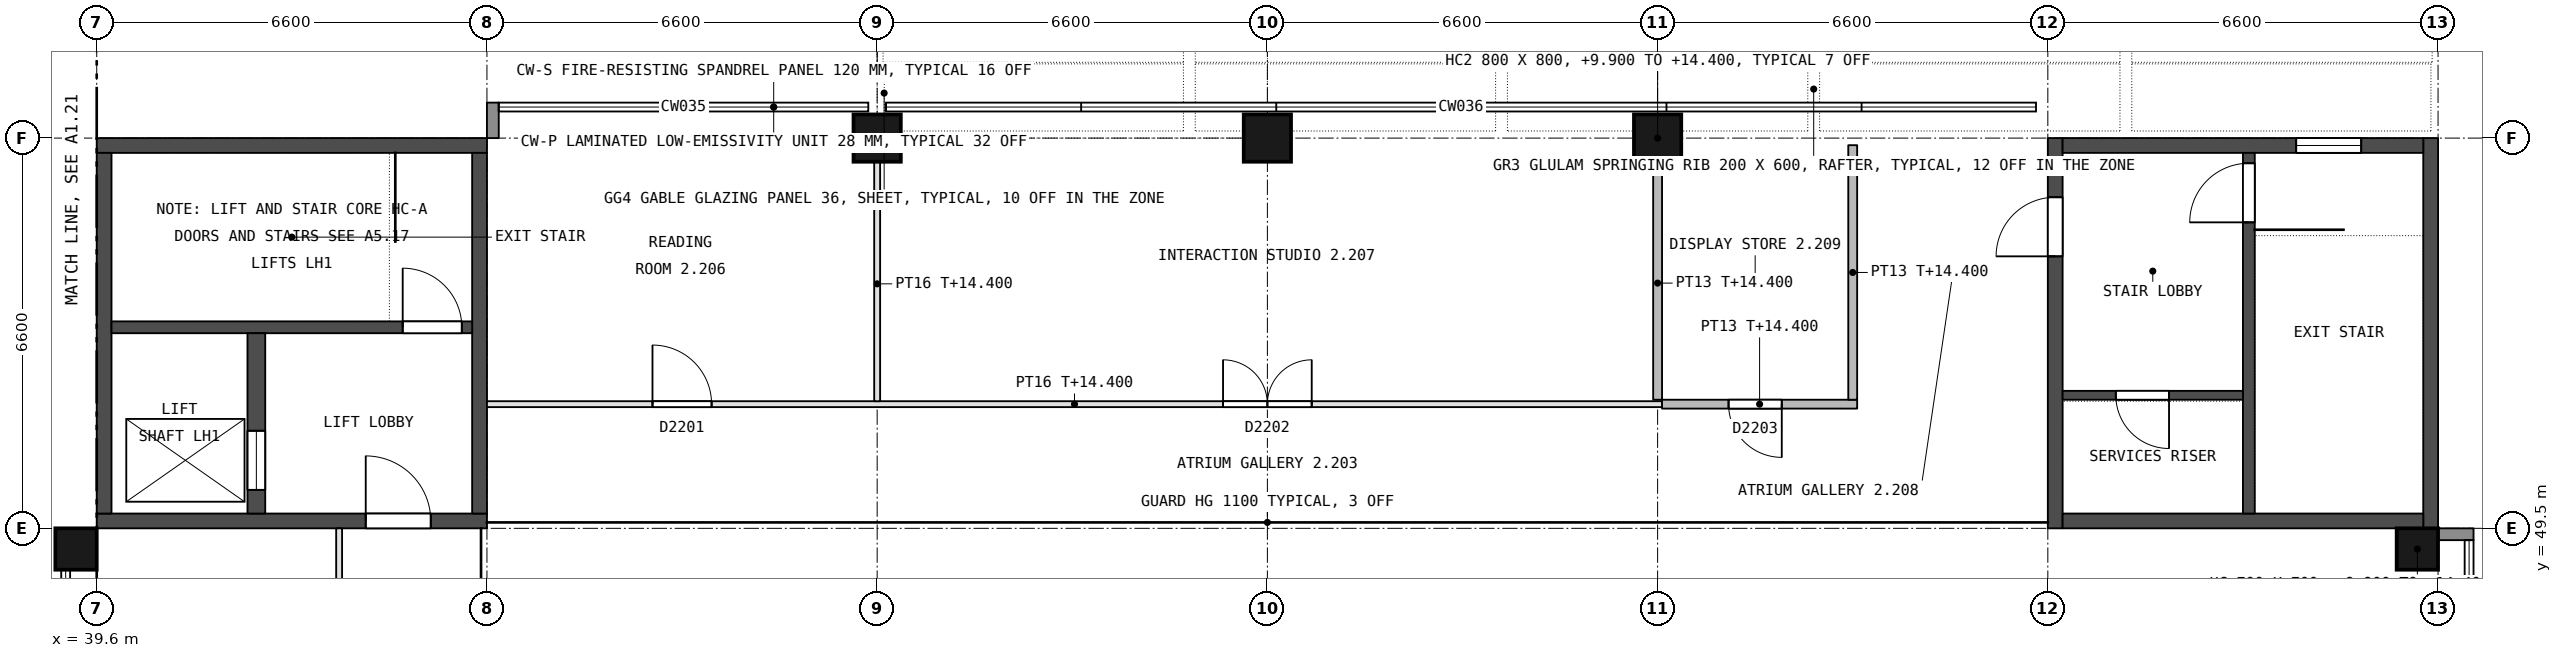
"""IFC4 building model, lengths in metres.
Left out: names, types, materials, properties, quantities, classifications, styles, units other than length and angle.
Written with IfcOpenShell. Run it as: python <this file> out.ifc"""

import sys

from ifc_helpers import new_model, si_unit, direction, frame, frame_2d, origin, origin_2d, place, context, subcontext, project, spatial, rectangle, extrude, element, fill, save


model = new_model("IFC4")
c1 = context("Model", 3, precision=1e-05, world=origin(), true_north=direction((0.0, 1.0)))
c2 = subcontext(c1, "Body", "Model", "MODEL_VIEW")
j1 = project(units=[si_unit("LENGTHUNIT", "METRE"), si_unit("PLANEANGLEUNIT", "RADIAN")], contexts=[c1])
p1 = place(None, origin())
s1 = spatial("IfcSite", under=j1, at=p1, CompositionType="ELEMENT")
p2 = place(p1, origin())
s2 = spatial("IfcBuilding", under=s1, at=p2, CompositionType="ELEMENT")
p3 = place(p2, frame((0.0, 0.0, 9.9)))
s3 = spatial("IfcBuildingStorey", under=s2, at=p3, CompositionType="ELEMENT", Elevation=9.9)
for number, where, z_axis, x_axis in (
    (1, (52.8, 56.1, 0.0), (0.0, 0.0, 1.0), (1.0, 0.0, 0.0)),
    (2, (59.4, 56.1, 0.0), (0.0, 0.0, 1.0), (1.0, 0.0, 0.0)),
    (3, (66.0, 56.1, 0.0), (0.0, 0.0, 1.0), (1.0, 0.0, 0.0)),
):
    element("IfcColumn", number, at=place(p3, frame(where, z_axis=z_axis, x_axis=x_axis)), inside=s3, PredefinedType="COLUMN", context=c2, shape_type="SweptSolid", body=[
        extrude(rectangle(XDim=0.8, YDim=0.8, at=origin_2d()), origin(), (0.0, 0.0, 1.0), 4.5),
    ])
for number, where, z_axis, x_axis in (
    (4, (39.25, 49.15, 0.0), (0.0, 0.0, 1.0), (1.0, 0.0, 0.0)),
    (5, (78.85, 49.15, 0.0), (0.0, 0.0, 1.0), (1.0, 0.0, 0.0)),
):
    element("IfcColumn", number, at=place(p3, frame(where, z_axis=z_axis, x_axis=x_axis)), inside=s3, PredefinedType="COLUMN", context=c2, shape_type="SweptSolid", body=[
        extrude(rectangle(XDim=0.7, YDim=0.7, at=origin_2d()), origin(), (0.0, 0.0, 1.0), 4.5),
    ])
p4 = place(p3, frame((39.6, 49.625, 0.0), z_axis=(0.0, 0.0, 1.0), x_axis=(1.0, 0.0, 0.0)))
e6 = element("IfcWall", 6, at=p4, inside=s3, PredefinedType="SHEAR", context=c2, shape_type="SweptSolid", body=[
    extrude(rectangle(XDim=6.6, YDim=0.25, at=frame_2d((3.3, 0.0))), origin(), (0.0, 0.0, 1.0), 4.25),
])
p5 = place(p4, frame((4.55, 0.0, 0.0)))
e7 = element("IfcOpeningElement", 7, at=p5, cuts=e6, PredefinedType="OPENING", context=c2, shape_type="SweptSolid", body=[
    extrude(rectangle(XDim=1.1, YDim=2.1, at=frame_2d((0.55, 1.05))), frame((0.0, 0.135, 0.0), z_axis=(0.0, -1.0, 0.0), x_axis=(1.0, 0.0, 0.0)), (0.0, 0.0, 1.0), 0.27),
])
p6 = place(p3, frame((39.6, 55.975, 0.0), z_axis=(0.0, 0.0, 1.0), x_axis=(1.0, 0.0, 0.0)))
e8 = element("IfcWall", 8, at=p6, inside=s3, PredefinedType="SHEAR", context=c2, shape_type="SweptSolid", body=[
    extrude(rectangle(XDim=6.6, YDim=0.25, at=frame_2d((3.3, 0.0))), origin(), (0.0, 0.0, 1.0), 4.25),
])
for number, where, z_axis, x_axis in (
    (9, (46.075, 49.75, 0.0), (0.0, 0.0, 1.0), (0.0, 1.0, 0.0)),
    (10, (39.725, 49.75, 0.0), (0.0, 0.0, 1.0), (0.0, 1.0, 0.0)),
):
    element("IfcWall", number, at=place(p3, frame(where, z_axis=z_axis, x_axis=x_axis)), inside=s3, PredefinedType="SHEAR", context=c2, shape_type="SweptSolid", body=[
        extrude(rectangle(XDim=6.1, YDim=0.25, at=frame_2d((3.05, 0.0))), origin(), (0.0, 0.0, 1.0), 4.25),
    ])
p7 = place(p3, frame((39.85, 52.9, 0.0), z_axis=(0.0, 0.0, 1.0), x_axis=(1.0, 0.0, 0.0)))
e11 = element("IfcWall", 11, at=p7, inside=s3, PredefinedType="SHEAR", context=c2, shape_type="SweptSolid", body=[
    extrude(rectangle(XDim=6.1, YDim=0.2, at=frame_2d((3.05, 0.0))), origin(), (0.0, 0.0, 1.0), 4.25),
])
p8 = place(p7, frame((4.925, 0.0, 0.0)))
e12 = element("IfcOpeningElement", 12, at=p8, cuts=e11, PredefinedType="OPENING", context=c2, shape_type="SweptSolid", body=[
    extrude(rectangle(XDim=1.0, YDim=2.1, at=frame_2d((0.5, 1.05))), frame((0.0, 0.11, 0.0), z_axis=(0.0, -1.0, 0.0), x_axis=(1.0, 0.0, 0.0)), (0.0, 0.0, 1.0), 0.22),
])
p9 = place(p3, frame((42.3, 49.75, 0.0), z_axis=(0.0, 0.0, 1.0), x_axis=(0.0, 1.0, 0.0)))
e13 = element("IfcWall", 13, at=p9, inside=s3, PredefinedType="SHEAR", context=c2, shape_type="SweptSolid", body=[
    extrude(rectangle(XDim=3.05, YDim=0.3, at=frame_2d((1.525, 0.0))), origin(), (0.0, 0.0, 1.0), 4.25),
])
p10 = place(p9, frame((0.4, 0.0, 0.0)))
e14 = element("IfcOpeningElement", 14, at=p10, cuts=e13, PredefinedType="OPENING", context=c2, shape_type="SweptSolid", body=[
    extrude(rectangle(XDim=1.0, YDim=2.1, at=frame_2d((0.5, 1.05))), frame((0.0, 0.16, 0.0), z_axis=(0.0, -1.0, 0.0), x_axis=(1.0, 0.0, 0.0)), (0.0, 0.0, 1.0), 0.32),
])
p11 = place(p3, frame((72.725, 56.1, 0.0), z_axis=(0.0, 0.0, 1.0), x_axis=(0.0, -1.0, 0.0)))
e15 = element("IfcWall", 15, at=p11, inside=s3, PredefinedType="SHEAR", context=c2, shape_type="SweptSolid", body=[
    extrude(rectangle(XDim=6.6, YDim=0.25, at=frame_2d((3.3, 0.0))), origin(), (0.0, 0.0, 1.0), 4.25),
])
p12 = place(p11, frame((1.0, 0.0, 0.0)))
e16 = element("IfcOpeningElement", 16, at=p12, cuts=e15, PredefinedType="OPENING", context=c2, shape_type="SweptSolid", body=[
    extrude(rectangle(XDim=1.0, YDim=2.1, at=frame_2d((0.5, 1.05))), frame((0.0, 0.135, 0.0), z_axis=(0.0, -1.0, 0.0), x_axis=(1.0, 0.0, 0.0)), (0.0, 0.0, 1.0), 0.27),
])
p13 = place(p3, frame((79.075, 56.1, 0.0), z_axis=(0.0, 0.0, 1.0), x_axis=(0.0, -1.0, 0.0)))
e17 = element("IfcWall", 17, at=p13, inside=s3, PredefinedType="SHEAR", context=c2, shape_type="SweptSolid", body=[
    extrude(rectangle(XDim=6.6, YDim=0.25, at=frame_2d((3.3, 0.0))), origin(), (0.0, 0.0, 1.0), 4.25),
])
p14 = place(p3, frame((72.85, 55.975, 0.0), z_axis=(0.0, 0.0, 1.0), x_axis=(1.0, 0.0, 0.0)))
e18 = element("IfcWall", 18, at=p14, inside=s3, PredefinedType="SHEAR", context=c2, shape_type="SweptSolid", body=[
    extrude(rectangle(XDim=6.1, YDim=0.25, at=frame_2d((3.05, 0.0))), origin(), (0.0, 0.0, 1.0), 4.25),
])
p15 = place(p14, frame((3.95, 0.0, 0.7)))
e19 = element("IfcOpeningElement", 19, at=p15, cuts=e18, PredefinedType="OPENING", context=c2, shape_type="SweptSolid", body=[
    extrude(rectangle(XDim=1.1, YDim=1.5, at=frame_2d((0.55, 0.75))), frame((0.0, 0.135, 0.0), z_axis=(0.0, -1.0, 0.0), x_axis=(1.0, 0.0, 0.0)), (0.0, 0.0, 1.0), 0.27),
])
p16 = place(p3, frame((72.85, 49.625, 0.0), z_axis=(0.0, 0.0, 1.0), x_axis=(1.0, 0.0, 0.0)))
e20 = element("IfcWall", 20, at=p16, inside=s3, PredefinedType="SHEAR", context=c2, shape_type="SweptSolid", body=[
    extrude(rectangle(XDim=6.1, YDim=0.25, at=frame_2d((3.05, 0.0))), origin(), (0.0, 0.0, 1.0), 4.25),
])
p17 = place(p3, frame((76.0, 55.85, 0.0), z_axis=(0.0, 0.0, 1.0), x_axis=(0.0, -1.0, 0.0)))
e21 = element("IfcWall", 21, at=p17, inside=s3, PredefinedType="SHEAR", context=c2, shape_type="SweptSolid", body=[
    extrude(rectangle(XDim=6.1, YDim=0.2, at=frame_2d((3.05, 0.0))), origin(), (0.0, 0.0, 1.0), 4.25),
])
p18 = place(p17, frame((0.175, 0.0, 0.0)))
e22 = element("IfcOpeningElement", 22, at=p18, cuts=e21, PredefinedType="OPENING", context=c2, shape_type="SweptSolid", body=[
    extrude(rectangle(XDim=1.0, YDim=2.1, at=frame_2d((0.5, 1.05))), frame((0.0, 0.11, 0.0), z_axis=(0.0, -1.0, 0.0), x_axis=(1.0, 0.0, 0.0)), (0.0, 0.0, 1.0), 0.22),
])
p19 = place(p3, frame((72.85, 51.75, 0.0), z_axis=(0.0, 0.0, 1.0), x_axis=(1.0, 0.0, 0.0)))
e23 = element("IfcWall", 23, at=p19, inside=s3, PredefinedType="SHEAR", context=c2, shape_type="SweptSolid", body=[
    extrude(rectangle(XDim=3.05, YDim=0.15, at=frame_2d((1.525, 0.0))), origin(), (0.0, 0.0, 1.0), 4.25),
])
p20 = place(p19, frame((0.9, 0.0, 0.0)))
e24 = element("IfcOpeningElement", 24, at=p20, cuts=e23, PredefinedType="OPENING", context=c2, shape_type="SweptSolid", body=[
    extrude(rectangle(XDim=0.9, YDim=2.1, at=frame_2d((0.45, 1.05))), frame((0.0, 0.085, 0.0), z_axis=(0.0, -1.0, 0.0), x_axis=(1.0, 0.0, 0.0)), (0.0, 0.0, 1.0), 0.17),
])
p21 = place(p3, frame((79.2, 49.4, 0.0), z_axis=(0.0, 0.0, 1.0), x_axis=(1.0, 0.0, 0.0)))
e25 = element("IfcWall", 25, at=p21, inside=s3, PredefinedType="STANDARD", context=c2, shape_type="SweptSolid", body=[
    extrude(rectangle(XDim=0.6, YDim=0.2, at=frame_2d((0.3, 0.0))), origin(), (0.0, 0.0, 1.0), 4.5),
])
p22 = place(p3, frame((46.3, 56.1, 0.0), z_axis=(0.0, 0.0, 1.0), x_axis=(0.0, 1.0, 0.0)))
e26 = element("IfcWall", 26, at=p22, inside=s3, PredefinedType="STANDARD", context=c2, shape_type="SweptSolid", body=[
    extrude(rectangle(XDim=0.6, YDim=0.2, at=frame_2d((0.3, 0.0))), origin(), (0.0, 0.0, 1.0), 4.5),
])
p23 = place(p3, frame((39.6, 49.4, 0.0), z_axis=(0.0, 0.0, 1.0), x_axis=(-1.0, 0.0, 0.0)))
e27 = element("IfcWall", 27, at=p23, inside=s3, PredefinedType="STANDARD", context=c2, shape_type="SweptSolid", body=[
    extrude(rectangle(XDim=0.6, YDim=0.2, at=frame_2d((0.3, 0.0))), origin(), (0.0, 0.0, 1.0), 4.5),
])
p24 = place(p3, frame((46.2, 51.6, 0.0), z_axis=(0.0, 0.0, 1.0), x_axis=(1.0, 0.0, 0.0)))
e28 = element("IfcWall", 28, at=p24, inside=s3, PredefinedType="PARTITIONING", context=c2, shape_type="SweptSolid", body=[
    extrude(rectangle(XDim=19.875, YDim=0.1, at=frame_2d((9.938, 0.0))), origin(), (0.0, 0.0, 1.0), 4.5),
])
p25 = place(p24, frame((2.8, 0.0, 0.0)))
e29 = element("IfcOpeningElement", 29, at=p25, cuts=e28, PredefinedType="OPENING", context=c2, shape_type="SweptSolid", body=[
    extrude(rectangle(XDim=1.0, YDim=2.1, at=frame_2d((0.5, 1.05))), frame((0.0, 0.06, 0.0), z_axis=(0.0, -1.0, 0.0), x_axis=(1.0, 0.0, 0.0)), (0.0, 0.0, 1.0), 0.12),
])
p26 = place(p24, frame((12.45, 0.0, 0.0)))
e30 = element("IfcOpeningElement", 30, at=p26, cuts=e28, PredefinedType="OPENING", context=c2, shape_type="SweptSolid", body=[
    extrude(rectangle(XDim=1.5, YDim=2.1, at=frame_2d((0.75, 1.05))), frame((0.0, 0.06, 0.0), z_axis=(0.0, -1.0, 0.0), x_axis=(1.0, 0.0, 0.0)), (0.0, 0.0, 1.0), 0.12),
])
p27 = place(p3, frame((66.075, 51.6, 0.0), z_axis=(0.0, 0.0, 1.0), x_axis=(1.0, 0.0, 0.0)))
e31 = element("IfcWall", 31, at=p27, inside=s3, PredefinedType="PARTITIONING", context=c2, shape_type="SweptSolid", body=[
    extrude(rectangle(XDim=3.3, YDim=0.15, at=frame_2d((1.65, 0.0))), origin(), (0.0, 0.0, 1.0), 4.5),
])
p28 = place(p27, frame((1.125, 0.0, 0.0)))
e32 = element("IfcOpeningElement", 32, at=p28, cuts=e31, PredefinedType="OPENING", context=c2, shape_type="SweptSolid", body=[
    extrude(rectangle(XDim=0.9, YDim=2.1, at=frame_2d((0.45, 1.05))), frame((0.0, 0.085, 0.0), z_axis=(0.0, -1.0, 0.0), x_axis=(1.0, 0.0, 0.0)), (0.0, 0.0, 1.0), 0.17),
])
p29 = place(p3, frame((43.7, 42.9, 0.0), z_axis=(0.0, 0.0, 1.0), x_axis=(0.0, 1.0, 0.0)))
e33 = element("IfcWall", 33, at=p29, inside=s3, PredefinedType="PARTITIONING", context=c2, shape_type="SweptSolid", body=[
    extrude(rectangle(XDim=6.6, YDim=0.1, at=frame_2d((3.3, 0.0))), origin(), (0.0, 0.0, 1.0), 4.5),
])
p30 = place(p29, frame((2.8, 0.0, 0.0)))
e34 = element("IfcOpeningElement", 34, at=p30, cuts=e33, PredefinedType="OPENING", context=c2, shape_type="SweptSolid", body=[
    extrude(rectangle(XDim=1.0, YDim=2.1, at=frame_2d((0.5, 1.05))), frame((0.0, 0.06, 0.0), z_axis=(0.0, -1.0, 0.0), x_axis=(1.0, 0.0, 0.0)), (0.0, 0.0, 1.0), 0.12),
])
p31 = place(p3, frame((52.8, 51.65, 0.0), z_axis=(0.0, 0.0, 1.0), x_axis=(0.0, 1.0, 0.0)))
e35 = element("IfcWall", 35, at=p31, inside=s3, PredefinedType="PARTITIONING", context=c2, shape_type="SweptSolid", body=[
    extrude(rectangle(XDim=4.05, YDim=0.1, at=frame_2d((2.025, 0.0))), origin(), (0.0, 0.0, 1.0), 4.5),
])
p32 = place(p3, frame((66.0, 51.675, 0.0), z_axis=(0.0, 0.0, 1.0), x_axis=(0.0, 1.0, 0.0)))
e36 = element("IfcWall", 36, at=p32, inside=s3, PredefinedType="PARTITIONING", context=c2, shape_type="SweptSolid", body=[
    extrude(rectangle(XDim=4.025, YDim=0.15, at=frame_2d((2.012, 0.0))), origin(), (0.0, 0.0, 1.0), 4.5),
])
p33 = place(p3, frame((69.3, 51.675, 0.0), z_axis=(0.0, 0.0, 1.0), x_axis=(0.0, 1.0, 0.0)))
e37 = element("IfcWall", 37, at=p33, inside=s3, PredefinedType="PARTITIONING", context=c2, shape_type="SweptSolid", body=[
    extrude(rectangle(XDim=4.305, YDim=0.15, at=frame_2d((2.152, 0.0))), origin(), (0.0, 0.0, 1.0), 4.5),
])
p34 = place(p5, origin())
e38 = element("IfcDoor", 38, at=p34, inside=s3, OperationType="SINGLE_SWING_LEFT", PredefinedType="DOOR", context=c2, shape_type="SweptSolid", body=[
    extrude(rectangle(XDim=1.1, YDim=2.1, at=frame_2d((0.55, 1.05))), frame((0.0, 0.025, 0.0), z_axis=(0.0, -1.0, 0.0), x_axis=(1.0, 0.0, 0.0)), (0.0, 0.0, 1.0), 0.05),
])
fill(e7, e38)
p35 = place(p8, origin())
e39 = element("IfcDoor", 39, at=p35, inside=s3, OperationType="SINGLE_SWING_LEFT", PredefinedType="DOOR", context=c2, shape_type="SweptSolid", body=[
    extrude(rectangle(XDim=1.0, YDim=2.1, at=frame_2d((0.5, 1.05))), frame((0.0, 0.025, 0.0), z_axis=(0.0, -1.0, 0.0), x_axis=(1.0, 0.0, 0.0)), (0.0, 0.0, 1.0), 0.05),
])
fill(e12, e39)
p36 = place(p10, origin())
e40 = element("IfcDoor", 40, at=p36, inside=s3, OperationType="DOUBLE_DOOR_SLIDING", PredefinedType="NOTDEFINED", context=c2, shape_type="SweptSolid", body=[
    extrude(rectangle(XDim=1.0, YDim=2.1, at=frame_2d((0.5, 1.05))), frame((0.0, 0.025, 0.0), z_axis=(0.0, -1.0, 0.0), x_axis=(1.0, 0.0, 0.0)), (0.0, 0.0, 1.0), 0.05),
])
fill(e14, e40)
p37 = place(p20, origin())
e41 = element("IfcDoor", 41, at=p37, inside=s3, OperationType="SINGLE_SWING_RIGHT", PredefinedType="DOOR", context=c2, shape_type="SweptSolid", body=[
    extrude(rectangle(XDim=0.9, YDim=2.1, at=frame_2d((0.45, 1.05))), frame((0.0, 0.025, 0.0), z_axis=(0.0, -1.0, 0.0), x_axis=(1.0, 0.0, 0.0)), (0.0, 0.0, 1.0), 0.05),
])
fill(e24, e41)
p38 = place(p12, origin())
e42 = element("IfcDoor", 42, at=p38, inside=s3, OperationType="SINGLE_SWING_RIGHT", PredefinedType="DOOR", context=c2, shape_type="SweptSolid", body=[
    extrude(rectangle(XDim=1.0, YDim=2.1, at=frame_2d((0.5, 1.05))), frame((0.0, 0.025, 0.0), z_axis=(0.0, -1.0, 0.0), x_axis=(1.0, 0.0, 0.0)), (0.0, 0.0, 1.0), 0.05),
])
fill(e16, e42)
p39 = place(p18, origin())
e43 = element("IfcDoor", 43, at=p39, inside=s3, OperationType="SINGLE_SWING_RIGHT", PredefinedType="DOOR", context=c2, shape_type="SweptSolid", body=[
    extrude(rectangle(XDim=1.0, YDim=2.1, at=frame_2d((0.5, 1.05))), frame((0.0, 0.025, 0.0), z_axis=(0.0, -1.0, 0.0), x_axis=(1.0, 0.0, 0.0)), (0.0, 0.0, 1.0), 0.05),
])
fill(e22, e43)
p40 = place(p15, origin())
e44 = element("IfcWindow", 44, at=p40, inside=s3, PartitioningType="SINGLE_PANEL", PredefinedType="WINDOW", context=c2, shape_type="SweptSolid", body=[
    extrude(rectangle(XDim=1.1, YDim=1.5, at=frame_2d((0.55, 0.75))), frame((0.0, 0.03, 0.0), z_axis=(0.0, -1.0, 0.0), x_axis=(1.0, 0.0, 0.0)), (0.0, 0.0, 1.0), 0.06),
])
fill(e19, e44)
p41 = place(p25, origin())
e45 = element("IfcDoor", 45, at=p41, inside=s3, OperationType="SINGLE_SWING_LEFT", PredefinedType="DOOR", context=c2, shape_type="SweptSolid", body=[
    extrude(rectangle(XDim=1.0, YDim=2.1, at=frame_2d((0.5, 1.05))), frame((0.0, 0.025, 0.0), z_axis=(0.0, -1.0, 0.0), x_axis=(1.0, 0.0, 0.0)), (0.0, 0.0, 1.0), 0.05),
])
fill(e29, e45)
p42 = place(p26, origin())
e46 = element("IfcDoor", 46, at=p42, inside=s3, OperationType="DOUBLE_DOOR_SINGLE_SWING", PredefinedType="DOOR", context=c2, shape_type="SweptSolid", body=[
    extrude(rectangle(XDim=1.5, YDim=2.1, at=frame_2d((0.75, 1.05))), frame((0.0, 0.025, 0.0), z_axis=(0.0, -1.0, 0.0), x_axis=(1.0, 0.0, 0.0)), (0.0, 0.0, 1.0), 0.05),
])
fill(e30, e46)
p43 = place(p28, origin())
e47 = element("IfcDoor", 47, at=p43, inside=s3, OperationType="SINGLE_SWING_RIGHT", PredefinedType="DOOR", context=c2, shape_type="SweptSolid", body=[
    extrude(rectangle(XDim=0.9, YDim=2.1, at=frame_2d((0.45, 1.05))), frame((0.0, 0.025, 0.0), z_axis=(0.0, -1.0, 0.0), x_axis=(1.0, 0.0, 0.0)), (0.0, 0.0, 1.0), 0.05),
])
fill(e32, e47)
save(model, sys.argv[1])
